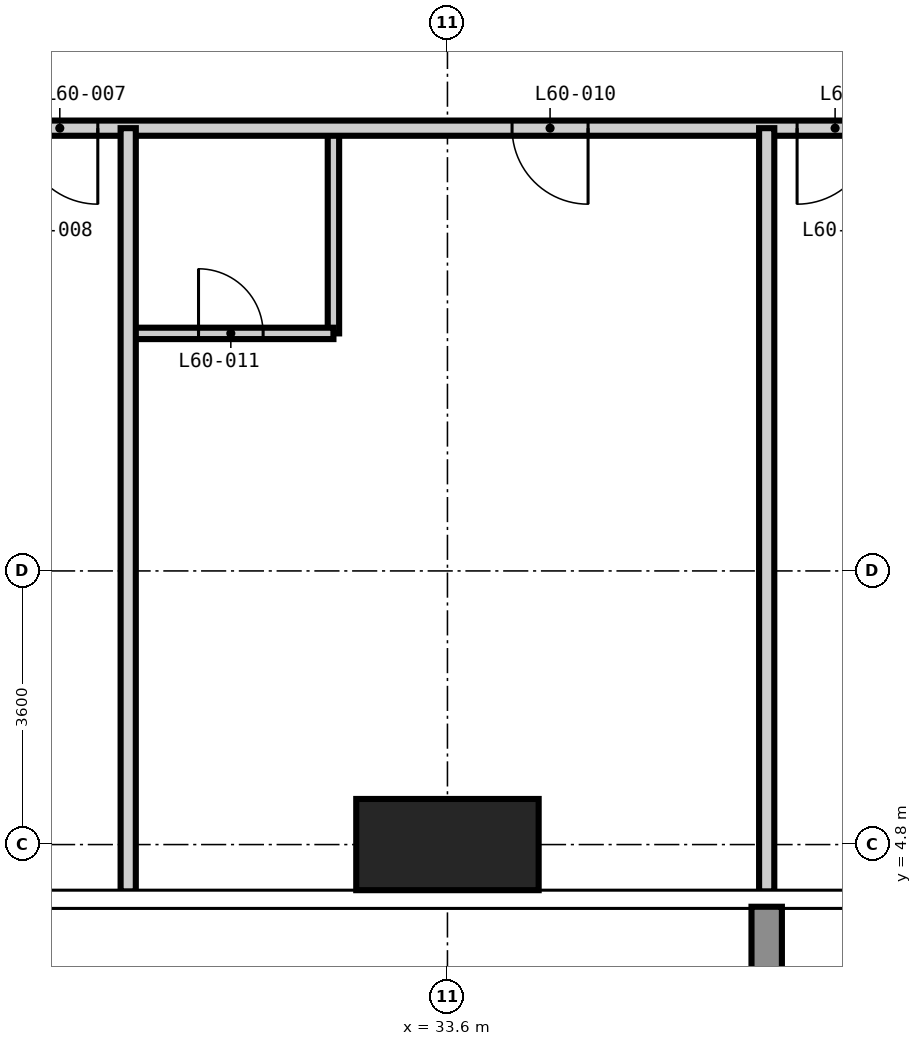
"""IFC4 building model, lengths in metres.
Left out: names, types, materials, properties, quantities, classifications, styles, units other than length and angle.
Written with IfcOpenShell. Run it as: python <this file> out.ifc"""

import sys

from ifc_helpers import new_model, si_unit, direction, frame, frame_2d, origin, origin_2d, place, context, subcontext, project, spatial, rectangle, extrude, element, fill, save


model = new_model("IFC4")
c1 = context("Model", 3, precision=1e-05, world=origin(), true_north=direction((0.0, 1.0)))
c2 = subcontext(c1, "Body", "Model", "MODEL_VIEW")
j1 = project(units=[si_unit("LENGTHUNIT", "METRE"), si_unit("PLANEANGLEUNIT", "RADIAN")], contexts=[c1])
p1 = place(None, origin())
s1 = spatial("IfcSite", under=j1, at=p1, CompositionType="ELEMENT")
p2 = place(p1, origin())
s2 = spatial("IfcBuilding", under=s1, at=p2, CompositionType="ELEMENT")
p3 = place(p2, frame((0.0, 0.0, 233.4)))
s3 = spatial("IfcBuildingStorey", under=s2, at=p3, CompositionType="ELEMENT", Elevation=233.4)
p4 = place(p3, frame((33.6, 4.8, -0.35), z_axis=(0.0, 0.0, 1.0), x_axis=(1.0, 0.0, 0.0)))
e1 = element("IfcColumn", 1, at=p4, inside=s3, PredefinedType="COLUMN", context=c2, shape_type="SweptSolid", body=[
    extrude(rectangle(XDim=2.4, YDim=1.2, at=origin_2d()), origin(), (0.0, 0.0, 1.0), 3.9),
])
p5 = place(p3, frame((32.1, 11.525, 0.0), z_axis=(0.0, 0.0, 1.0), x_axis=(0.0, 1.0, 0.0)))
e2 = element("IfcWall", 2, at=p5, inside=s3, PredefinedType="PARTITIONING", context=c2, shape_type="SweptSolid", body=[
    extrude(rectangle(XDim=2.7, YDim=0.15, at=frame_2d((1.35, 0.0))), origin(), (0.0, 0.0, 1.0), 3.55),
])
p6 = place(p3, frame((29.4, 11.525, 0.0), z_axis=(0.0, 0.0, 1.0), x_axis=(1.0, 0.0, 0.0)))
e3 = element("IfcWall", 3, at=p6, inside=s3, PredefinedType="PARTITIONING", context=c2, shape_type="SweptSolid", body=[
    extrude(rectangle(XDim=2.7, YDim=0.15, at=frame_2d((1.35, 0.0))), origin(), (0.0, 0.0, 1.0), 3.55),
])
p7 = place(p6, frame((0.925, 0.0, 0.0)))
e4 = element("IfcOpeningElement", 4, at=p7, cuts=e3, PredefinedType="OPENING", context=c2, shape_type="SweptSolid", body=[
    extrude(rectangle(XDim=0.85, YDim=2.1, at=frame_2d((0.425, 1.05))), frame((0.0, 0.085, 0.0), z_axis=(0.0, -1.0, 0.0), x_axis=(1.0, 0.0, 0.0)), (0.0, 0.0, 1.0), 0.17),
])
p8 = place(p3, frame((44.875, 14.225, 0.0), z_axis=(0.0, 0.0, 1.0), x_axis=(-1.0, 0.0, 0.0)))
e5 = element("IfcWall", 5, at=p8, inside=s3, PredefinedType="PARTITIONING", context=c2, shape_type="SweptSolid", body=[
    extrude(rectangle(XDim=22.25, YDim=0.2, at=frame_2d((11.125, 0.0))), origin(), (0.0, 0.0, 1.0), 3.55),
])
p9 = place(p8, frame((15.875, 0.0, 0.0)))
e6 = element("IfcOpeningElement", 6, at=p9, cuts=e5, PredefinedType="OPENING", context=c2, shape_type="SweptSolid", body=[
    extrude(rectangle(XDim=1.0, YDim=2.2, at=frame_2d((0.5, 1.1))), frame((0.0, 0.11, 0.0), z_axis=(0.0, -1.0, 0.0), x_axis=(1.0, 0.0, 0.0)), (0.0, 0.0, 1.0), 0.22),
])
p10 = place(p8, frame((9.425, 0.0, 0.0)))
e7 = element("IfcOpeningElement", 7, at=p10, cuts=e5, PredefinedType="OPENING", context=c2, shape_type="SweptSolid", body=[
    extrude(rectangle(XDim=1.0, YDim=2.2, at=frame_2d((0.5, 1.1))), frame((0.0, 0.11, 0.0), z_axis=(0.0, -1.0, 0.0), x_axis=(1.0, 0.0, 0.0)), (0.0, 0.0, 1.0), 0.22),
])
p11 = place(p8, frame((5.675, 0.0, 0.0)))
e8 = element("IfcOpeningElement", 8, at=p11, cuts=e5, PredefinedType="OPENING", context=c2, shape_type="SweptSolid", body=[
    extrude(rectangle(XDim=1.0, YDim=2.2, at=frame_2d((0.5, 1.1))), frame((0.0, 0.11, 0.0), z_axis=(0.0, -1.0, 0.0), x_axis=(1.0, 0.0, 0.0)), (0.0, 0.0, 1.0), 0.22),
])
for number, where, z_axis, x_axis in (
    (9, (29.4, 4.182, 0.0), (0.0, 0.0, 1.0), (0.0, 1.0, 0.0)),
    (10, (37.8, 4.182, 0.0), (0.0, 0.0, 1.0), (0.0, 1.0, 0.0)),
):
    element("IfcWall", number, at=place(p3, frame(where, z_axis=z_axis, x_axis=x_axis)), inside=s3, PredefinedType="PARTITIONING", context=c2, shape_type="SweptSolid", body=[
        extrude(rectangle(XDim=10.043, YDim=0.2, at=frame_2d((5.021, 0.0))), origin(), (0.0, 0.0, 1.0), 3.55),
    ])
p12 = place(p9, origin())
e11 = element("IfcDoor", 11, at=p12, inside=s3, OperationType="SINGLE_SWING_LEFT", PredefinedType="DOOR", context=c2, shape_type="SweptSolid", body=[
    extrude(rectangle(XDim=1.0, YDim=2.2, at=frame_2d((0.5, 1.1))), frame((0.0, 0.025, 0.0), z_axis=(0.0, -1.0, 0.0), x_axis=(1.0, 0.0, 0.0)), (0.0, 0.0, 1.0), 0.05),
])
fill(e6, e11)
p13 = place(p10, origin())
e12 = element("IfcDoor", 12, at=p13, inside=s3, OperationType="SINGLE_SWING_LEFT", PredefinedType="DOOR", context=c2, shape_type="SweptSolid", body=[
    extrude(rectangle(XDim=1.0, YDim=2.2, at=frame_2d((0.5, 1.1))), frame((0.0, 0.025, 0.0), z_axis=(0.0, -1.0, 0.0), x_axis=(1.0, 0.0, 0.0)), (0.0, 0.0, 1.0), 0.05),
])
fill(e7, e12)
p14 = place(p7, origin())
e13 = element("IfcDoor", 13, at=p14, inside=s3, OperationType="SINGLE_SWING_LEFT", PredefinedType="DOOR", context=c2, shape_type="SweptSolid", body=[
    extrude(rectangle(XDim=0.85, YDim=2.1, at=frame_2d((0.425, 1.05))), frame((0.0, 0.025, 0.0), z_axis=(0.0, -1.0, 0.0), x_axis=(1.0, 0.0, 0.0)), (0.0, 0.0, 1.0), 0.05),
])
fill(e4, e13)
p15 = place(p11, origin())
e14 = element("IfcDoor", 14, at=p15, inside=s3, OperationType="SINGLE_SWING_RIGHT", PredefinedType="DOOR", context=c2, shape_type="SweptSolid", body=[
    extrude(rectangle(XDim=1.0, YDim=2.2, at=frame_2d((0.5, 1.1))), frame((0.0, 0.025, 0.0), z_axis=(0.0, -1.0, 0.0), x_axis=(1.0, 0.0, 0.0)), (0.0, 0.0, 1.0), 0.05),
])
fill(e8, e14)
save(model, sys.argv[1])
